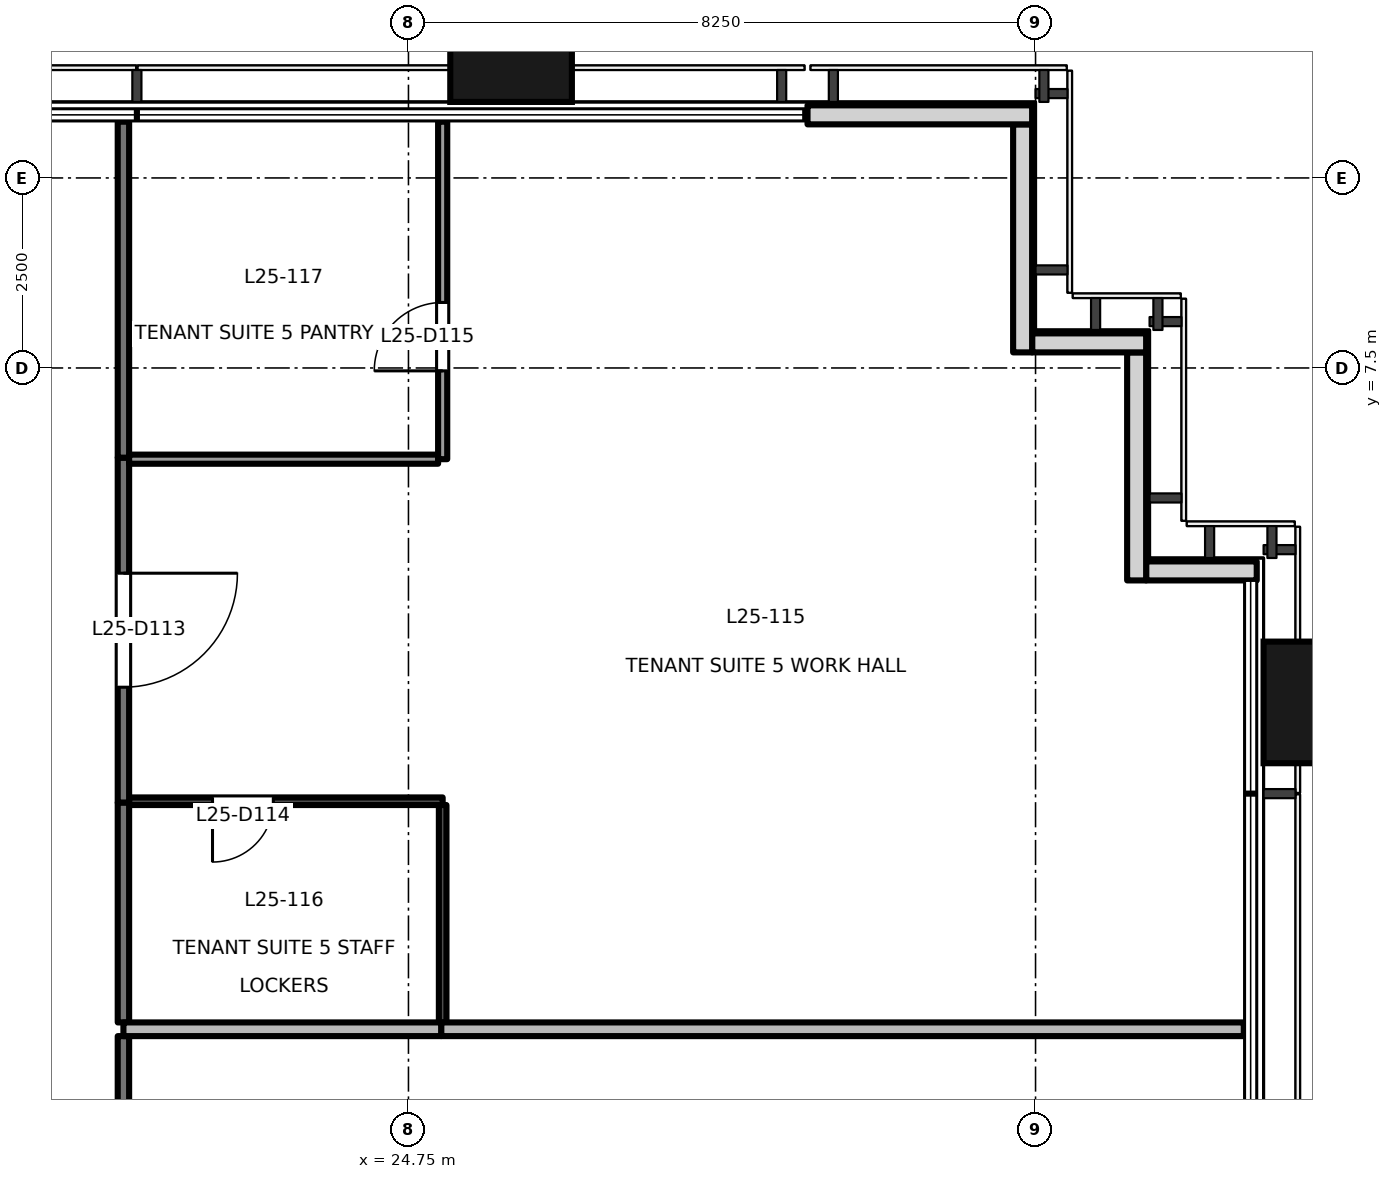
"""IFC4 building model, lengths in metres.
Left out: names, types, materials, properties, quantities, classifications, styles, units other than length and angle.
Written with IfcOpenShell. Run it as: python <this file> out.ifc"""

import sys

from ifc_helpers import new_model, si_unit, direction, frame, frame_2d, origin, origin_2d, place, context, subcontext, project, spatial, rectangle, extrude, element, fill, save


model = new_model("IFC4")
c1 = context("Model", 3, precision=1e-05, world=origin(), true_north=direction((0.0, 1.0)))
c2 = subcontext(c1, "Body", "Model", "MODEL_VIEW")
j1 = project(units=[si_unit("LENGTHUNIT", "METRE"), si_unit("PLANEANGLEUNIT", "RADIAN")], contexts=[c1])
p1 = place(None, origin())
s1 = spatial("IfcSite", under=j1, at=p1, CompositionType="ELEMENT")
p2 = place(p1, origin())
s2 = spatial("IfcBuilding", under=s1, at=p2, CompositionType="ELEMENT")
p3 = place(p2, frame((0.0, 0.0, 111.7)))
s3 = spatial("IfcBuildingStorey", under=s2, at=p3, CompositionType="ELEMENT", Elevation=111.7)
for number, where, z_axis, x_axis in (
    (1, (36.9, 3.1, -0.2), (0.0, 0.0, 1.0), (0.0, 1.0, 0.0)),
    (2, (26.1, 11.9, -0.2), (0.0, 0.0, 1.0), (1.0, 0.0, 0.0)),
):
    element("IfcColumn", number, at=place(p3, frame(where, z_axis=z_axis, x_axis=x_axis)), inside=s3, PredefinedType="COLUMN", context=c2, shape_type="SweptSolid", body=[
        extrude(rectangle(XDim=1.6, YDim=1.8, at=origin_2d()), origin(), (0.0, 0.0, 1.0), 4.0),
    ])
p4 = place(p3, frame((35.91, 4.83, 0.0), z_axis=(0.0, 0.0, 1.0), x_axis=(-1.0, 0.0, 0.0)))
e3 = element("IfcWall", 3, at=p4, inside=s3, PredefinedType="SOLIDWALL", context=c2, shape_type="SweptSolid", body=[
    extrude(rectangle(XDim=1.455, YDim=0.25, at=frame_2d((0.728, 0.0))), origin(), (0.0, 0.0, 1.0), 3.8),
])
p5 = place(p3, frame((34.33, 4.705, 0.0), z_axis=(0.0, 0.0, 1.0), x_axis=(0.0, 1.0, 0.0)))
e4 = element("IfcWall", 4, at=p5, inside=s3, PredefinedType="SOLIDWALL", context=c2, shape_type="SweptSolid", body=[
    extrude(rectangle(XDim=3.0, YDim=0.25, at=frame_2d((1.5, 0.0))), origin(), (0.0, 0.0, 1.0), 3.8),
])
p6 = place(p3, frame((34.455, 7.83, 0.0), z_axis=(0.0, 0.0, 1.0), x_axis=(-1.0, 0.0, 0.0)))
e5 = element("IfcWall", 5, at=p6, inside=s3, PredefinedType="SOLIDWALL", context=c2, shape_type="SweptSolid", body=[
    extrude(rectangle(XDim=1.5, YDim=0.25, at=frame_2d((0.75, 0.0))), origin(), (0.0, 0.0, 1.0), 3.8),
])
p7 = place(p3, frame((32.83, 7.705, 0.0), z_axis=(0.0, 0.0, 1.0), x_axis=(0.0, 1.0, 0.0)))
e6 = element("IfcWall", 6, at=p7, inside=s3, PredefinedType="SOLIDWALL", context=c2, shape_type="SweptSolid", body=[
    extrude(rectangle(XDim=3.0, YDim=0.25, at=frame_2d((1.5, 0.0))), origin(), (0.0, 0.0, 1.0), 3.8),
])
p8 = place(p3, frame((32.955, 10.83, 0.0), z_axis=(0.0, 0.0, 1.0), x_axis=(-1.0, 0.0, 0.0)))
e7 = element("IfcWall", 7, at=p8, inside=s3, PredefinedType="SOLIDWALL", context=c2, shape_type="SweptSolid", body=[
    extrude(rectangle(XDim=2.955, YDim=0.25, at=frame_2d((1.478, 0.0))), origin(), (0.0, 0.0, 1.0), 3.8),
])
p9 = place(p3, frame((21.0, -1.29, 0.0), z_axis=(0.0, 0.0, 1.0), x_axis=(0.0, -1.0, 0.0)))
e8 = element("IfcWall", 8, at=p9, inside=s3, PredefinedType="PARTITIONING", context=c2, shape_type="SweptSolid", body=[
    extrude(rectangle(XDim=6.23, YDim=0.15, at=frame_2d((3.115, 0.0))), origin(), (0.0, 0.0, 1.0), 2.9),
])
p10 = place(p9, frame((1.307, 0.0, 0.0)))
e9 = element("IfcOpeningElement", 9, at=p10, cuts=e8, PredefinedType="OPENING", context=c2, shape_type="SweptSolid", body=[
    extrude(rectangle(XDim=1.5, YDim=2.1, at=frame_2d((0.75, 1.05))), frame((0.0, 0.085, 0.0), z_axis=(0.0, -1.0, 0.0), x_axis=(1.0, 0.0, 0.0)), (0.0, 0.0, 1.0), 0.171),
])
p11 = place(p3, frame((21.0, 6.32, 0.0), z_axis=(0.0, 0.0, 1.0), x_axis=(0.0, -1.0, 0.0)))
e10 = element("IfcWall", 10, at=p11, inside=s3, PredefinedType="PARTITIONING", context=c2, shape_type="SweptSolid", body=[
    extrude(rectangle(XDim=4.54, YDim=0.15, at=frame_2d((2.27, 0.0))), origin(), (0.0, 0.0, 1.0), 2.9),
])
p12 = place(p11, frame((1.52, 0.0, 0.0)))
e11 = element("IfcOpeningElement", 11, at=p12, cuts=e10, PredefinedType="OPENING", context=c2, shape_type="SweptSolid", body=[
    extrude(rectangle(XDim=1.5, YDim=2.1, at=frame_2d((0.75, 1.05))), frame((0.0, 0.085, 0.0), z_axis=(0.0, -1.0, 0.0), x_axis=(1.0, 0.0, 0.0)), (0.0, 0.0, 1.0), 0.171),
])
p13 = place(p3, frame((21.0, 1.78, 0.0), z_axis=(0.0, 0.0, 1.0), x_axis=(0.0, -1.0, 0.0)))
e12 = element("IfcWall", 12, at=p13, inside=s3, PredefinedType="PARTITIONING", context=c2, shape_type="SweptSolid", body=[
    extrude(rectangle(XDim=2.89, YDim=0.15, at=frame_2d((1.445, 0.0))), origin(), (0.0, 0.0, 1.0), 2.9),
])
p14 = place(p3, frame((21.0, 10.74, 0.0), z_axis=(0.0, 0.0, 1.0), x_axis=(0.0, -1.0, 0.0)))
e13 = element("IfcWall", 13, at=p14, inside=s3, PredefinedType="PARTITIONING", context=c2, shape_type="SweptSolid", body=[
    extrude(rectangle(XDim=4.42, YDim=0.15, at=frame_2d((2.21, 0.0))), origin(), (0.0, 0.0, 1.0), 3.8),
])
p15 = place(p3, frame((25.18, -1.2, 0.0), z_axis=(0.0, 0.0, 1.0), x_axis=(1.0, 0.0, 0.0)))
e14 = element("IfcWall", 14, at=p15, inside=s3, PredefinedType="PARTITIONING", context=c2, shape_type="SweptSolid", body=[
    extrude(rectangle(XDim=10.56, YDim=0.18, at=frame_2d((5.28, 0.0))), origin(), (0.0, 0.0, 1.0), 3.8),
])
p16 = place(p3, frame((21.0, -1.2, 0.0), z_axis=(0.0, 0.0, 1.0), x_axis=(1.0, 0.0, 0.0)))
e15 = element("IfcWall", 15, at=p16, inside=s3, PredefinedType="PARTITIONING", context=c2, shape_type="SweptSolid", body=[
    extrude(rectangle(XDim=4.18, YDim=0.18, at=frame_2d((2.09, 0.0))), origin(), (0.0, 0.0, 1.0), 3.8),
])
p17 = place(p3, frame((25.2, 1.8, 0.0), z_axis=(0.0, 0.0, 1.0), x_axis=(-1.0, 0.0, 0.0)))
e16 = element("IfcWall", 16, at=p17, inside=s3, PredefinedType="PARTITIONING", context=c2, shape_type="SweptSolid", body=[
    extrude(rectangle(XDim=4.125, YDim=0.1, at=frame_2d((2.062, 0.0))), origin(), (0.0, 0.0, 1.0), 3.8),
])
p18 = place(p17, frame((2.228, 0.0, 0.0)))
e17 = element("IfcOpeningElement", 17, at=p18, cuts=e16, PredefinedType="OPENING", context=c2, shape_type="SweptSolid", body=[
    extrude(rectangle(XDim=0.8, YDim=2.1, at=frame_2d((0.4, 1.05))), frame((0.0, 0.061, 0.0), z_axis=(0.0, -1.0, 0.0), x_axis=(1.0, 0.0, 0.0)), (0.0, 0.0, 1.0), 0.121),
])
p19 = place(p3, frame((25.2, -1.11, 0.0), z_axis=(0.0, 0.0, 1.0), x_axis=(0.0, 1.0, 0.0)))
e18 = element("IfcWall", 18, at=p19, inside=s3, PredefinedType="PARTITIONING", context=c2, shape_type="SweptSolid", body=[
    extrude(rectangle(XDim=2.86, YDim=0.1, at=frame_2d((1.43, 0.0))), origin(), (0.0, 0.0, 1.0), 2.9),
])
p20 = place(p3, frame((21.075, 6.3, 0.0), z_axis=(0.0, 0.0, 1.0), x_axis=(1.0, 0.0, 0.0)))
e19 = element("IfcWall", 19, at=p20, inside=s3, PredefinedType="PARTITIONING", context=c2, shape_type="SweptSolid", body=[
    extrude(rectangle(XDim=4.065, YDim=0.12, at=frame_2d((2.032, 0.0))), origin(), (0.0, 0.0, 1.0), 3.8),
])
p21 = place(p3, frame((25.2, 6.3, 0.0), z_axis=(0.0, 0.0, 1.0), x_axis=(0.0, 1.0, 0.0)))
e20 = element("IfcWall", 20, at=p21, inside=s3, PredefinedType="PARTITIONING", context=c2, shape_type="SweptSolid", body=[
    extrude(rectangle(XDim=4.44, YDim=0.12, at=frame_2d((2.22, 0.0))), origin(), (0.0, 0.0, 1.0), 3.8),
])
p22 = place(p21, frame((1.162, 0.0, 0.0)))
e21 = element("IfcOpeningElement", 21, at=p22, cuts=e20, PredefinedType="OPENING", context=c2, shape_type="SweptSolid", body=[
    extrude(rectangle(XDim=0.9, YDim=2.1, at=frame_2d((0.45, 1.05))), frame((0.0, 0.071, 0.0), z_axis=(0.0, -1.0, 0.0), x_axis=(1.0, 0.0, 0.0)), (0.0, 0.0, 1.0), 0.141),
])
p23 = place(p12, origin())
e22 = element("IfcDoor", 22, at=p23, inside=s3, OperationType="DOUBLE_DOOR_SINGLE_SWING", PredefinedType="DOOR", context=c2, shape_type="SweptSolid", body=[
    extrude(rectangle(XDim=1.5, YDim=2.1, at=frame_2d((0.75, 1.05))), frame((0.0, 0.025, 0.0), z_axis=(0.0, -1.0, 0.0), x_axis=(1.0, 0.0, 0.0)), (0.0, 0.0, 1.0), 0.05),
])
fill(e11, e22)
p24 = place(p18, origin())
e23 = element("IfcDoor", 23, at=p24, inside=s3, OperationType="SINGLE_SWING_RIGHT", PredefinedType="DOOR", context=c2, shape_type="SweptSolid", body=[
    extrude(rectangle(XDim=0.8, YDim=2.1, at=frame_2d((0.4, 1.05))), frame((0.0, 0.025, 0.0), z_axis=(0.0, -1.0, 0.0), x_axis=(1.0, 0.0, 0.0)), (0.0, 0.0, 1.0), 0.05),
])
fill(e17, e23)
p25 = place(p22, origin())
e24 = element("IfcDoor", 24, at=p25, inside=s3, OperationType="SINGLE_SWING_LEFT", PredefinedType="DOOR", context=c2, shape_type="SweptSolid", body=[
    extrude(rectangle(XDim=0.9, YDim=2.1, at=frame_2d((0.45, 1.05))), frame((0.0, 0.025, 0.0), z_axis=(0.0, -1.0, 0.0), x_axis=(1.0, 0.0, 0.0)), (0.0, 0.0, 1.0), 0.05),
])
fill(e21, e24)
save(model, sys.argv[1])
